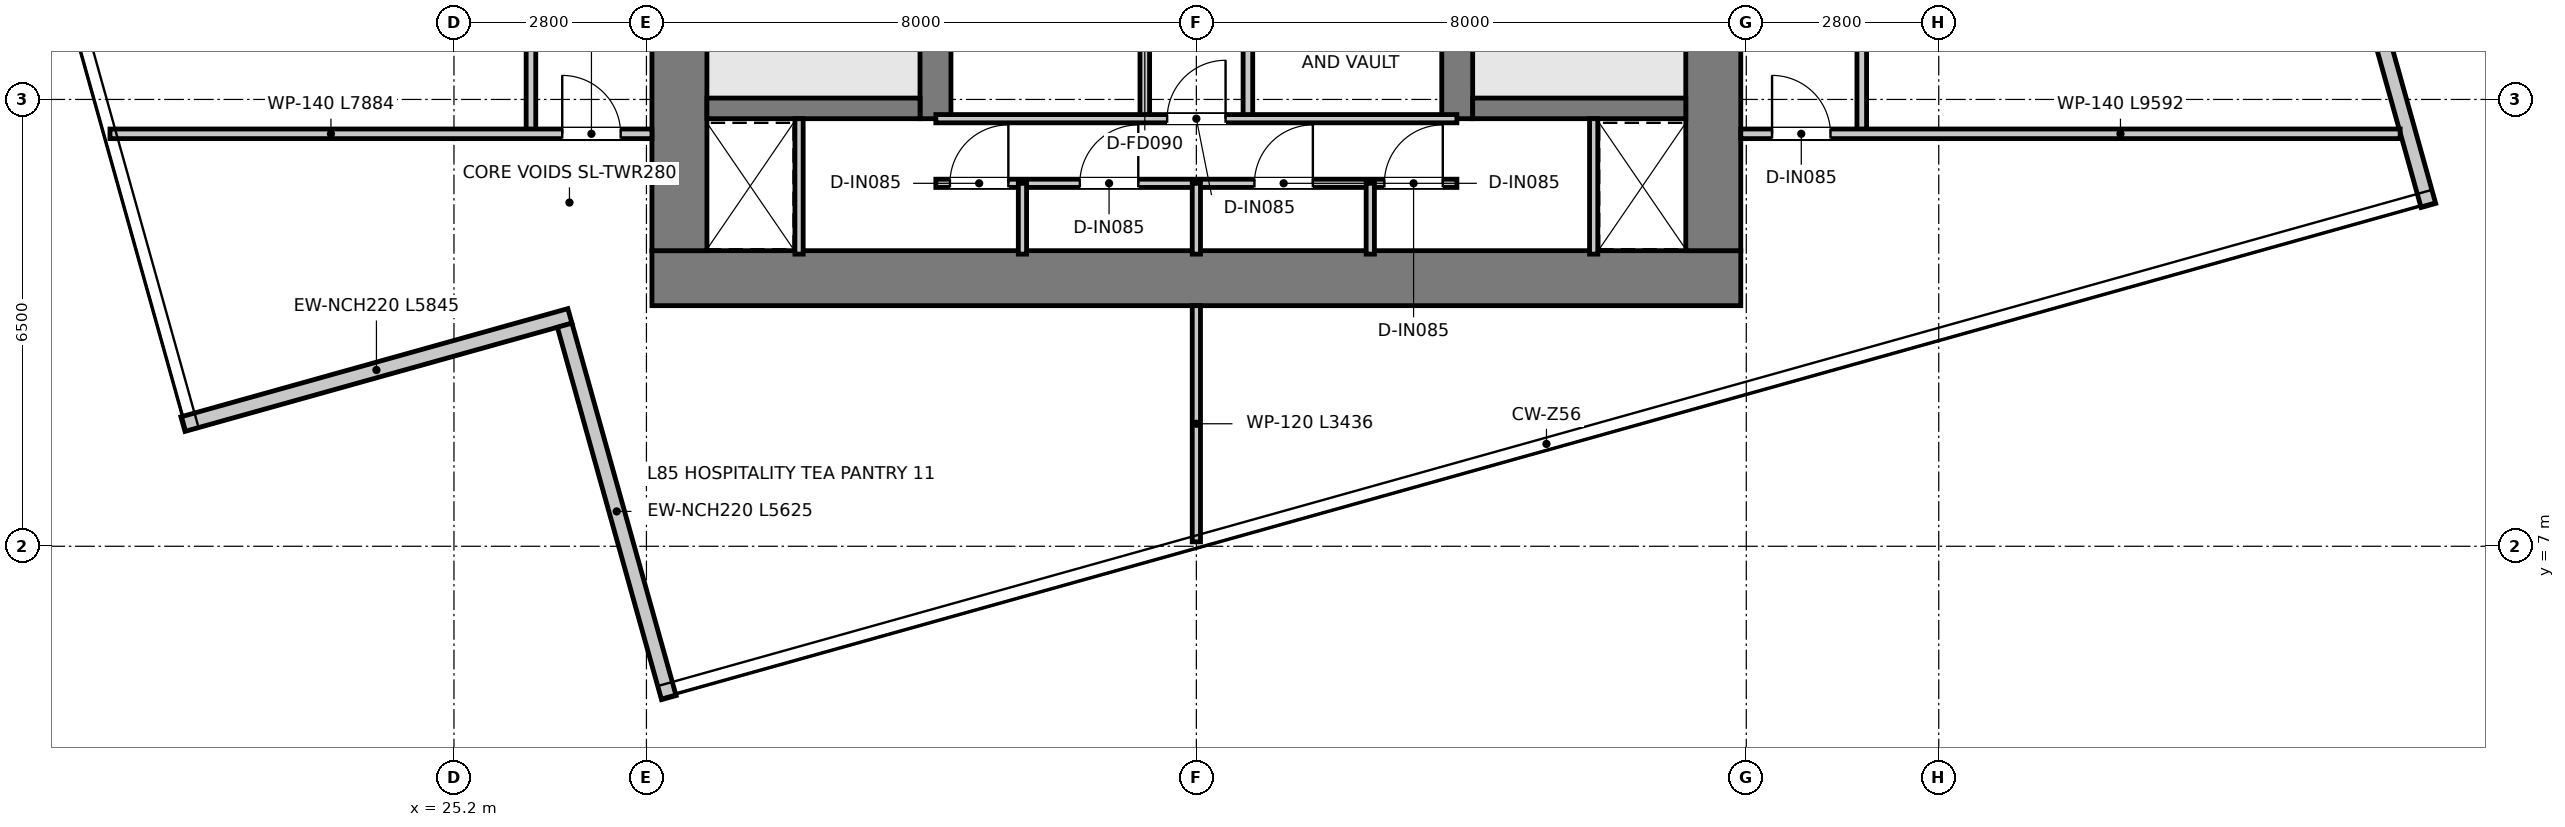
"""IFC4 building model, lengths in metres.
Left out: names, types, materials, properties, quantities, classifications, styles, units other than length and angle.
Written with IfcOpenShell. Run it as: python <this file> out.ifc"""

import sys

from ifc_helpers import new_model, si_unit, direction, frame, frame_2d, origin, place, context, subcontext, project, spatial, rectangle, extrude, element, fill, save


model = new_model("IFC4")
c1 = context("Model", 3, precision=1e-05, world=origin(), true_north=direction((0.0, 1.0)))
c2 = subcontext(c1, "Body", "Model", "MODEL_VIEW")
j1 = project(units=[si_unit("LENGTHUNIT", "METRE"), si_unit("PLANEANGLEUNIT", "RADIAN")], contexts=[c1])
p1 = place(None, origin())
s1 = spatial("IfcSite", under=j1, at=p1, CompositionType="ELEMENT")
p2 = place(p1, origin())
s2 = spatial("IfcBuilding", under=s1, at=p2, CompositionType="ELEMENT")
p3 = place(p2, frame((0.0, 0.0, 347.45)))
s3 = spatial("IfcBuildingStorey", under=s2, at=p3, CompositionType="ELEMENT", Elevation=347.45)
p4 = place(p3, frame((28.08, 10.9, 0.0), z_axis=(0.0, 0.0, 1.0), x_axis=(1.0, 0.0, 0.0)))
e1 = element("IfcWall", 1, at=p4, inside=s3, PredefinedType="SHEAR", context=c2, shape_type="SweptSolid", body=[
    extrude(rectangle(XDim=15.84, YDim=0.8, at=frame_2d((7.92, 0.0))), origin(), (0.0, 0.0, 1.0), 3.95),
])
for number, where, z_axis, x_axis in (
    (2, (28.48, 11.3, 0.0), (0.0, 0.0, 1.0), (0.0, 1.0, 0.0)),
    (3, (43.52, 11.3, 0.0), (0.0, 0.0, 1.0), (0.0, 1.0, 0.0)),
):
    element("IfcWall", number, at=place(p3, frame(where, z_axis=z_axis, x_axis=x_axis)), inside=s3, PredefinedType="SHEAR", context=c2, shape_type="SweptSolid", body=[
        extrude(rectangle(XDim=14.7, YDim=0.8, at=frame_2d((7.35, 0.0))), origin(), (0.0, 0.0, 1.0), 3.95),
    ])
p5 = place(p3, frame((32.205, 13.22, 0.0), z_axis=(0.0, 0.0, 1.0), x_axis=(0.0, 1.0, 0.0)))
e4 = element("IfcWall", 4, at=p5, inside=s3, PredefinedType="SHEAR", context=c2, shape_type="SweptSolid", body=[
    extrude(rectangle(XDim=12.78, YDim=0.45, at=frame_2d((6.39, 0.0))), origin(), (0.0, 0.0, 1.0), 3.95),
])
p6 = place(p5, frame((10.58, 0.0, 0.0)))
e5 = element("IfcOpeningElement", 5, at=p6, cuts=e4, PredefinedType="OPENING", context=c2, shape_type="SweptSolid", body=[
    extrude(rectangle(XDim=1.1, YDim=2.15, at=frame_2d((0.55, 1.075))), frame((0.0, 0.235, 0.0), z_axis=(0.0, -1.0, 0.0), x_axis=(1.0, 0.0, 0.0)), (0.0, 0.0, 1.0), 0.47),
])
p7 = place(p3, frame((39.795, 13.22, 0.0), z_axis=(0.0, 0.0, 1.0), x_axis=(0.0, 1.0, 0.0)))
e6 = element("IfcWall", 6, at=p7, inside=s3, PredefinedType="SHEAR", context=c2, shape_type="SweptSolid", body=[
    extrude(rectangle(XDim=12.78, YDim=0.45, at=frame_2d((6.39, 0.0))), origin(), (0.0, 0.0, 1.0), 3.95),
])
p8 = place(p7, frame((10.58, 0.0, 0.0)))
e7 = element("IfcOpeningElement", 7, at=p8, cuts=e6, PredefinedType="OPENING", context=c2, shape_type="SweptSolid", body=[
    extrude(rectangle(XDim=1.1, YDim=2.15, at=frame_2d((0.55, 1.075))), frame((0.0, 0.235, 0.0), z_axis=(0.0, -1.0, 0.0), x_axis=(1.0, 0.0, 0.0)), (0.0, 0.0, 1.0), 0.47),
])
for number, where, z_axis, x_axis in (
    (8, (28.88, 13.37, 0.0), (0.0, 0.0, 1.0), (1.0, 0.0, 0.0)),
    (9, (40.02, 13.37, 0.0), (0.0, 0.0, 1.0), (1.0, 0.0, 0.0)),
):
    element("IfcWall", number, at=place(p3, frame(where, z_axis=z_axis, x_axis=x_axis)), inside=s3, PredefinedType="SHEAR", context=c2, shape_type="SweptSolid", body=[
        extrude(rectangle(XDim=3.1, YDim=0.3, at=frame_2d((1.55, 0.0))), origin(), (0.0, 0.0, 1.0), 3.95),
    ])
p9 = place(p3, frame((21.258, 8.777, 0.0), z_axis=(0.0, 0.0, 1.0), x_axis=(0.963036430781, 0.269371180695, 0.0)))
e10 = element("IfcWall", 10, at=p9, inside=s3, PredefinedType="ELEMENTEDWALL", context=c2, shape_type="SweptSolid", body=[
    extrude(rectangle(XDim=5.845, YDim=0.22, at=frame_2d((2.922, 0.0))), origin(), (0.0, 0.0, 1.0), 3.67),
])
p10 = place(p3, frame((26.81, 10.216, 0.0), z_axis=(0.0, 0.0, 1.0), x_axis=(0.269362667524, -0.963038811961, 0.0)))
e11 = element("IfcWall", 11, at=p10, inside=s3, PredefinedType="ELEMENTEDWALL", context=c2, shape_type="SweptSolid", body=[
    extrude(rectangle(XDim=5.625, YDim=0.22, at=frame_2d((2.812, 0.0))), origin(), (0.0, 0.0, 1.0), 3.67),
])
p11 = place(p3, frame((53.923, 11.958, 0.0), z_axis=(0.0, 0.0, 1.0), x_axis=(-0.26932160756, 0.96305029552, 0.0)))
e12 = element("IfcWall", 12, at=p11, inside=s3, PredefinedType="ELEMENTEDWALL", context=c2, shape_type="SweptSolid", body=[
    extrude(rectangle(XDim=5.845, YDim=0.22, at=frame_2d((2.923, 0.0))), origin(), (0.0, 0.0, 1.0), 3.67),
])
p12 = place(p3, frame((35.25, 13.22, 0.0), z_axis=(0.0, 0.0, 1.0), x_axis=(0.0, 1.0, 0.0)))
e13 = element("IfcWall", 13, at=p12, inside=s3, PredefinedType="PARTITIONING", context=c2, shape_type="SweptSolid", body=[
    extrude(rectangle(XDim=4.56, YDim=0.14, at=frame_2d((2.28, 0.0))), origin(), (0.0, 0.0, 1.0), 3.67),
])
p13 = place(p12, frame((1.93, 0.0, 0.0)))
e14 = element("IfcOpeningElement", 14, at=p13, cuts=e13, PredefinedType="OPENING", context=c2, shape_type="SweptSolid", body=[
    extrude(rectangle(XDim=0.9, YDim=2.1, at=frame_2d((0.45, 1.05))), frame((0.0, 0.08, 0.0), z_axis=(0.0, -1.0, 0.0), x_axis=(1.0, 0.0, 0.0)), (0.0, 0.0, 1.0), 0.16),
])
p14 = place(p3, frame((36.75, 13.22, 0.0), z_axis=(0.0, 0.0, 1.0), x_axis=(0.0, 1.0, 0.0)))
e15 = element("IfcWall", 15, at=p14, inside=s3, PredefinedType="PARTITIONING", context=c2, shape_type="SweptSolid", body=[
    extrude(rectangle(XDim=4.56, YDim=0.14, at=frame_2d((2.28, 0.0))), origin(), (0.0, 0.0, 1.0), 3.67),
])
p15 = place(p14, frame((1.93, 0.0, 0.0)))
e16 = element("IfcOpeningElement", 16, at=p15, cuts=e15, PredefinedType="OPENING", context=c2, shape_type="SweptSolid", body=[
    extrude(rectangle(XDim=0.9, YDim=2.1, at=frame_2d((0.45, 1.05))), frame((0.0, 0.08, 0.0), z_axis=(0.0, -1.0, 0.0), x_axis=(1.0, 0.0, 0.0)), (0.0, 0.0, 1.0), 0.16),
])
for number, where, z_axis, x_axis in (
    (17, (30.22, 11.25, 0.0), (0.0, 0.0, 1.0), (0.0, 1.0, 0.0)),
    (18, (41.78, 11.25, 0.0), (0.0, 0.0, 1.0), (0.0, 1.0, 0.0)),
):
    element("IfcWall", number, at=place(p3, frame(where, z_axis=z_axis, x_axis=x_axis)), inside=s3, PredefinedType="PARTITIONING", context=c2, shape_type="SweptSolid", body=[
        extrude(rectangle(XDim=1.97, YDim=0.12, at=frame_2d((0.985, 0.0))), origin(), (0.0, 0.0, 1.0), 3.67),
    ])
p16 = place(p3, frame((32.21, 13.22, 0.0), z_axis=(0.0, 0.0, 1.0), x_axis=(1.0, 0.0, 0.0)))
e19 = element("IfcWall", 19, at=p16, inside=s3, PredefinedType="PARTITIONING", context=c2, shape_type="SweptSolid", body=[
    extrude(rectangle(XDim=7.58, YDim=0.12, at=frame_2d((3.79, 0.0))), origin(), (0.0, 0.0, 1.0), 3.67),
])
p17 = place(p16, frame((3.365, 0.0, 0.0)))
e20 = element("IfcOpeningElement", 20, at=p17, cuts=e19, PredefinedType="OPENING", context=c2, shape_type="SweptSolid", body=[
    extrude(rectangle(XDim=0.85, YDim=2.1, at=frame_2d((0.425, 1.05))), frame((0.0, 0.07, 0.0), z_axis=(0.0, -1.0, 0.0), x_axis=(1.0, 0.0, 0.0)), (0.0, 0.0, 1.0), 0.14),
])
p18 = place(p3, frame((32.21, 12.28, 0.0), z_axis=(0.0, 0.0, 1.0), x_axis=(1.0, 0.0, 0.0)))
e21 = element("IfcWall", 21, at=p18, inside=s3, PredefinedType="PARTITIONING", context=c2, shape_type="SweptSolid", body=[
    extrude(rectangle(XDim=7.58, YDim=0.12, at=frame_2d((3.79, 0.0))), origin(), (0.0, 0.0, 1.0), 3.67),
])
p19 = place(p18, frame((0.205, 0.0, 0.0)))
e22 = element("IfcOpeningElement", 22, at=p19, cuts=e21, PredefinedType="OPENING", context=c2, shape_type="SweptSolid", body=[
    extrude(rectangle(XDim=0.85, YDim=2.1, at=frame_2d((0.425, 1.05))), frame((0.0, 0.07, 0.0), z_axis=(0.0, -1.0, 0.0), x_axis=(1.0, 0.0, 0.0)), (0.0, 0.0, 1.0), 0.14),
])
p20 = place(p18, frame((2.095, 0.0, 0.0)))
e23 = element("IfcOpeningElement", 23, at=p20, cuts=e21, PredefinedType="OPENING", context=c2, shape_type="SweptSolid", body=[
    extrude(rectangle(XDim=0.85, YDim=2.1, at=frame_2d((0.425, 1.05))), frame((0.0, 0.07, 0.0), z_axis=(0.0, -1.0, 0.0), x_axis=(1.0, 0.0, 0.0)), (0.0, 0.0, 1.0), 0.14),
])
p21 = place(p18, frame((4.635, 0.0, 0.0)))
e24 = element("IfcOpeningElement", 24, at=p21, cuts=e21, PredefinedType="OPENING", context=c2, shape_type="SweptSolid", body=[
    extrude(rectangle(XDim=0.85, YDim=2.1, at=frame_2d((0.425, 1.05))), frame((0.0, 0.07, 0.0), z_axis=(0.0, -1.0, 0.0), x_axis=(1.0, 0.0, 0.0)), (0.0, 0.0, 1.0), 0.14),
])
p22 = place(p18, frame((6.525, 0.0, 0.0)))
e25 = element("IfcOpeningElement", 25, at=p22, cuts=e21, PredefinedType="OPENING", context=c2, shape_type="SweptSolid", body=[
    extrude(rectangle(XDim=0.85, YDim=2.1, at=frame_2d((0.425, 1.05))), frame((0.0, 0.07, 0.0), z_axis=(0.0, -1.0, 0.0), x_axis=(1.0, 0.0, 0.0)), (0.0, 0.0, 1.0), 0.14),
])
for number, where, z_axis, x_axis in (
    (26, (33.47, 11.25, 0.0), (0.0, 0.0, 1.0), (0.0, 1.0, 0.0)),
    (27, (36.0, 11.25, 0.0), (0.0, 0.0, 1.0), (0.0, 1.0, 0.0)),
    (28, (38.53, 11.25, 0.0), (0.0, 0.0, 1.0), (0.0, 1.0, 0.0)),
):
    element("IfcWall", number, at=place(p3, frame(where, z_axis=z_axis, x_axis=x_axis)), inside=s3, PredefinedType="PARTITIONING", context=c2, shape_type="SweptSolid", body=[
        extrude(rectangle(XDim=1.03, YDim=0.12, at=frame_2d((0.515, 0.0))), origin(), (0.0, 0.0, 1.0), 3.67),
    ])
p23 = place(p3, frame((26.32, 13.0, 0.0), z_axis=(0.0, 0.0, 1.0), x_axis=(0.0, 1.0, 0.0)))
e29 = element("IfcWall", 29, at=p23, inside=s3, PredefinedType="PARTITIONING", context=c2, shape_type="SweptSolid", body=[
    extrude(rectangle(XDim=15.66, YDim=0.14, at=frame_2d((7.83, 0.0))), origin(), (0.0, 0.0, 1.0), 3.13),
])
p24 = place(p23, frame((14.3, 0.0, 0.0)))
e30 = element("IfcOpeningElement", 30, at=p24, cuts=e29, PredefinedType="OPENING", context=c2, shape_type="SweptSolid", body=[
    extrude(rectangle(XDim=0.9, YDim=2.1, at=frame_2d((0.45, 1.05))), frame((0.0, 0.08, 0.0), z_axis=(0.0, -1.0, 0.0), x_axis=(1.0, 0.0, 0.0)), (0.0, 0.0, 1.0), 0.16),
])
p25 = place(p23, frame((5.3, 0.0, 0.0)))
e31 = element("IfcOpeningElement", 31, at=p25, cuts=e29, PredefinedType="OPENING", context=c2, shape_type="SweptSolid", body=[
    extrude(rectangle(XDim=0.9, YDim=2.1, at=frame_2d((0.45, 1.05))), frame((0.0, 0.08, 0.0), z_axis=(0.0, -1.0, 0.0), x_axis=(1.0, 0.0, 0.0)), (0.0, 0.0, 1.0), 0.16),
])
p26 = place(p23, frame((8.75, 0.0, 0.0)))
e32 = element("IfcOpeningElement", 32, at=p26, cuts=e29, PredefinedType="OPENING", context=c2, shape_type="SweptSolid", body=[
    extrude(rectangle(XDim=0.9, YDim=2.1, at=frame_2d((0.45, 1.05))), frame((0.0, 0.08, 0.0), z_axis=(0.0, -1.0, 0.0), x_axis=(1.0, 0.0, 0.0)), (0.0, 0.0, 1.0), 0.16),
])
p27 = place(p23, frame((12.16, 0.0, 0.0)))
e33 = element("IfcOpeningElement", 33, at=p27, cuts=e29, PredefinedType="OPENING", context=c2, shape_type="SweptSolid", body=[
    extrude(rectangle(XDim=0.9, YDim=2.1, at=frame_2d((0.45, 1.05))), frame((0.0, 0.08, 0.0), z_axis=(0.0, -1.0, 0.0), x_axis=(1.0, 0.0, 0.0)), (0.0, 0.0, 1.0), 0.16),
])
p28 = place(p3, frame((45.68, 13.0, 0.0), z_axis=(0.0, 0.0, 1.0), x_axis=(0.0, 1.0, 0.0)))
e34 = element("IfcWall", 34, at=p28, inside=s3, PredefinedType="PARTITIONING", context=c2, shape_type="SweptSolid", body=[
    extrude(rectangle(XDim=15.66, YDim=0.14, at=frame_2d((7.83, 0.0))), origin(), (0.0, 0.0, 1.0), 3.13),
])
p29 = place(p28, frame((14.3, 0.0, 0.0)))
e35 = element("IfcOpeningElement", 35, at=p29, cuts=e34, PredefinedType="OPENING", context=c2, shape_type="SweptSolid", body=[
    extrude(rectangle(XDim=0.9, YDim=2.1, at=frame_2d((0.45, 1.05))), frame((0.0, 0.08, 0.0), z_axis=(0.0, -1.0, 0.0), x_axis=(1.0, 0.0, 0.0)), (0.0, 0.0, 1.0), 0.16),
])
p30 = place(p28, frame((5.3, 0.0, 0.0)))
e36 = element("IfcOpeningElement", 36, at=p30, cuts=e34, PredefinedType="OPENING", context=c2, shape_type="SweptSolid", body=[
    extrude(rectangle(XDim=0.9, YDim=2.1, at=frame_2d((0.45, 1.05))), frame((0.0, 0.08, 0.0), z_axis=(0.0, -1.0, 0.0), x_axis=(1.0, 0.0, 0.0)), (0.0, 0.0, 1.0), 0.16),
])
p31 = place(p28, frame((8.75, 0.0, 0.0)))
e37 = element("IfcOpeningElement", 37, at=p31, cuts=e34, PredefinedType="OPENING", context=c2, shape_type="SweptSolid", body=[
    extrude(rectangle(XDim=0.9, YDim=2.1, at=frame_2d((0.45, 1.05))), frame((0.0, 0.08, 0.0), z_axis=(0.0, -1.0, 0.0), x_axis=(1.0, 0.0, 0.0)), (0.0, 0.0, 1.0), 0.16),
])
p32 = place(p28, frame((12.16, 0.0, 0.0)))
e38 = element("IfcOpeningElement", 38, at=p32, cuts=e34, PredefinedType="OPENING", context=c2, shape_type="SweptSolid", body=[
    extrude(rectangle(XDim=0.9, YDim=2.1, at=frame_2d((0.45, 1.05))), frame((0.0, 0.08, 0.0), z_axis=(0.0, -1.0, 0.0), x_axis=(1.0, 0.0, 0.0)), (0.0, 0.0, 1.0), 0.16),
])
p33 = place(p3, frame((20.196, 13.0, 0.0), z_axis=(0.0, 0.0, 1.0), x_axis=(1.0, 0.0, 0.0)))
e39 = element("IfcWall", 39, at=p33, inside=s3, PredefinedType="PARTITIONING", context=c2, shape_type="SweptSolid", body=[
    extrude(rectangle(XDim=7.884, YDim=0.14, at=frame_2d((3.942, 0.0))), origin(), (0.0, 0.0, 1.0), 3.18),
])
p34 = place(p33, frame((6.579, 0.0, 0.0)))
e40 = element("IfcOpeningElement", 40, at=p34, cuts=e39, PredefinedType="OPENING", context=c2, shape_type="SweptSolid", body=[
    extrude(rectangle(XDim=0.85, YDim=2.1, at=frame_2d((0.425, 1.05))), frame((0.0, 0.08, 0.0), z_axis=(0.0, -1.0, 0.0), x_axis=(1.0, 0.0, 0.0)), (0.0, 0.0, 1.0), 0.16),
])
p35 = place(p3, frame((43.92, 13.0, 0.0), z_axis=(0.0, 0.0, 1.0), x_axis=(1.0, 0.0, 0.0)))
e41 = element("IfcWall", 41, at=p35, inside=s3, PredefinedType="PARTITIONING", context=c2, shape_type="SweptSolid", body=[
    extrude(rectangle(XDim=9.592, YDim=0.14, at=frame_2d((4.796, 0.0))), origin(), (0.0, 0.0, 1.0), 3.18),
])
p36 = place(p35, frame((0.455, 0.0, 0.0)))
e42 = element("IfcOpeningElement", 42, at=p36, cuts=e41, PredefinedType="OPENING", context=c2, shape_type="SweptSolid", body=[
    extrude(rectangle(XDim=0.85, YDim=2.1, at=frame_2d((0.425, 1.05))), frame((0.0, 0.08, 0.0), z_axis=(0.0, -1.0, 0.0), x_axis=(1.0, 0.0, 0.0)), (0.0, 0.0, 1.0), 0.16),
])
p37 = place(p3, frame((36.0, 7.064, 0.0), z_axis=(0.0, 0.0, 1.0), x_axis=(0.0, 1.0, 0.0)))
e43 = element("IfcWall", 43, at=p37, inside=s3, PredefinedType="PARTITIONING", context=c2, shape_type="SweptSolid", body=[
    extrude(rectangle(XDim=3.436, YDim=0.12, at=frame_2d((1.718, 0.0))), origin(), (0.0, 0.0, 1.0), 3.67),
])
p38 = place(p17, origin())
e44 = element("IfcDoor", 44, at=p38, inside=s3, OperationType="SINGLE_SWING_RIGHT", PredefinedType="DOOR", context=c2, shape_type="SweptSolid", body=[
    extrude(rectangle(XDim=0.85, YDim=2.1, at=frame_2d((0.425, 1.05))), frame((0.0, 0.025, 0.0), z_axis=(0.0, -1.0, 0.0), x_axis=(1.0, 0.0, 0.0)), (0.0, 0.0, 1.0), 0.05),
])
fill(e20, e44)
p39 = place(p19, origin())
e45 = element("IfcDoor", 45, at=p39, inside=s3, OperationType="SINGLE_SWING_RIGHT", PredefinedType="DOOR", context=c2, shape_type="SweptSolid", body=[
    extrude(rectangle(XDim=0.85, YDim=2.1, at=frame_2d((0.425, 1.05))), frame((0.0, 0.025, 0.0), z_axis=(0.0, -1.0, 0.0), x_axis=(1.0, 0.0, 0.0)), (0.0, 0.0, 1.0), 0.05),
])
fill(e22, e45)
p40 = place(p20, origin())
e46 = element("IfcDoor", 46, at=p40, inside=s3, OperationType="SINGLE_SWING_RIGHT", PredefinedType="DOOR", context=c2, shape_type="SweptSolid", body=[
    extrude(rectangle(XDim=0.85, YDim=2.1, at=frame_2d((0.425, 1.05))), frame((0.0, 0.025, 0.0), z_axis=(0.0, -1.0, 0.0), x_axis=(1.0, 0.0, 0.0)), (0.0, 0.0, 1.0), 0.05),
])
fill(e23, e46)
p41 = place(p21, origin())
e47 = element("IfcDoor", 47, at=p41, inside=s3, OperationType="SINGLE_SWING_RIGHT", PredefinedType="DOOR", context=c2, shape_type="SweptSolid", body=[
    extrude(rectangle(XDim=0.85, YDim=2.1, at=frame_2d((0.425, 1.05))), frame((0.0, 0.025, 0.0), z_axis=(0.0, -1.0, 0.0), x_axis=(1.0, 0.0, 0.0)), (0.0, 0.0, 1.0), 0.05),
])
fill(e24, e47)
p42 = place(p22, origin())
e48 = element("IfcDoor", 48, at=p42, inside=s3, OperationType="SINGLE_SWING_RIGHT", PredefinedType="DOOR", context=c2, shape_type="SweptSolid", body=[
    extrude(rectangle(XDim=0.85, YDim=2.1, at=frame_2d((0.425, 1.05))), frame((0.0, 0.025, 0.0), z_axis=(0.0, -1.0, 0.0), x_axis=(1.0, 0.0, 0.0)), (0.0, 0.0, 1.0), 0.05),
])
fill(e25, e48)
p43 = place(p34, origin())
e49 = element("IfcDoor", 49, at=p43, inside=s3, OperationType="SINGLE_SWING_LEFT", PredefinedType="DOOR", context=c2, shape_type="SweptSolid", body=[
    extrude(rectangle(XDim=0.85, YDim=2.1, at=frame_2d((0.425, 1.05))), frame((0.0, 0.025, 0.0), z_axis=(0.0, -1.0, 0.0), x_axis=(1.0, 0.0, 0.0)), (0.0, 0.0, 1.0), 0.05),
])
fill(e40, e49)
p44 = place(p36, origin())
e50 = element("IfcDoor", 50, at=p44, inside=s3, OperationType="SINGLE_SWING_LEFT", PredefinedType="DOOR", context=c2, shape_type="SweptSolid", body=[
    extrude(rectangle(XDim=0.85, YDim=2.1, at=frame_2d((0.425, 1.05))), frame((0.0, 0.025, 0.0), z_axis=(0.0, -1.0, 0.0), x_axis=(1.0, 0.0, 0.0)), (0.0, 0.0, 1.0), 0.05),
])
fill(e42, e50)
save(model, sys.argv[1])
